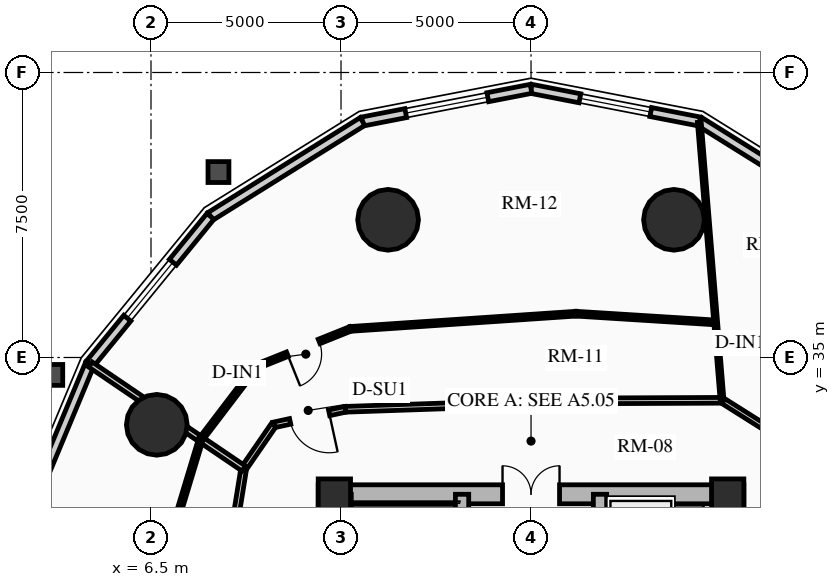
"""IFC4 building model, lengths in metres.
Left out: names, types, materials, properties, quantities, classifications, styles, units other than length and angle.
Written with IfcOpenShell. Run it as: python <this file> out.ifc"""

import sys

from ifc_helpers import new_model, si_unit, direction, frame, frame_2d, origin, origin_2d, place, context, subcontext, project, spatial, rectangle, circle, extrude, source, transform, mapped, element, fill, save


model = new_model("IFC4")
c1 = context("Model", 3, precision=1e-05, world=origin(), true_north=direction((0.0, 1.0)))
c2 = subcontext(c1, "Body", "Model", "MODEL_VIEW")
j1 = project(units=[si_unit("LENGTHUNIT", "METRE"), si_unit("PLANEANGLEUNIT", "RADIAN")], contexts=[c1])
p1 = place(None, origin())
s1 = spatial("IfcSite", under=j1, at=p1, CompositionType="ELEMENT")
p2 = place(p1, origin())
s2 = spatial("IfcBuilding", under=s1, at=p2, CompositionType="ELEMENT")
p3 = place(p2, frame((0.0, 0.0, 27.82)))
s3 = spatial("IfcBuildingStorey", under=s2, at=p3, CompositionType="ELEMENT", Elevation=27.82)
for number, where, z_axis, x_axis in (
    (1, (11.15, 17.35, 0.0), (0.0, 0.0, 1.0), (0.0, 1.0, 0.0)),
    (2, (21.85, 17.35, 0.0), (0.0, 0.0, 1.0), (0.0, 1.0, 0.0)),
):
    element("IfcWall", number, at=place(p3, frame(where, z_axis=z_axis, x_axis=x_axis)), inside=s3, PredefinedType="SHEAR", context=c2, shape_type="SweptSolid", body=[
        extrude(rectangle(XDim=14.3, YDim=0.5, at=frame_2d((7.15, 0.0))), origin(), (0.0, 0.0, 1.0), 2.91),
    ])
p4 = place(p3, frame((11.15, 31.4, 0.0), z_axis=(0.0, 0.0, 1.0), x_axis=(1.0, 0.0, 0.0)))
e3 = element("IfcWall", 3, at=p4, inside=s3, PredefinedType="SHEAR", context=c2, shape_type="SweptSolid", body=[
    extrude(rectangle(XDim=10.7, YDim=0.5, at=frame_2d((5.35, 0.0))), origin(), (0.0, 0.0, 1.0), 2.91),
])
m1 = source(origin(), c2, "Body", "SweptSolid", [
    extrude(rectangle(XDim=1.5, YDim=2.02, at=frame_2d((0.75, 1.01))), frame((0.0, 0.26, 0.0), z_axis=(0.0, -1.0, 0.0), x_axis=(1.0, 0.0, 0.0)), (0.0, 0.0, 1.0), 0.52),
])
p5 = place(p4, frame((4.6, 0.0, 0.0)))
e4 = element("IfcOpeningElement", 4, at=p5, cuts=e3, PredefinedType="OPENING", context=c2, shape_type="MappedRepresentation", body=[
    mapped(m1, transform((0.0, 0.0, 0.0), x_axis=(1.0, 0.0, 0.0), y_axis=(0.0, 1.0, 0.0), z_axis=(0.0, 0.0, 1.0), scale=1.0)),
])
p6 = place(p3, frame((14.685, 17.6, 0.0), z_axis=(0.0, 0.0, 1.0), x_axis=(0.0, 1.0, 0.0)))
e5 = element("IfcWall", 5, at=p6, inside=s3, PredefinedType="SHEAR", context=c2, shape_type="SweptSolid", body=[
    extrude(rectangle(XDim=13.8, YDim=0.35, at=frame_2d((6.9, 0.0))), origin(), (0.0, 0.0, 1.0), 2.91),
])
m2 = source(origin(), c2, "Body", "SweptSolid", [
    extrude(rectangle(XDim=1.1, YDim=2.015, at=frame_2d((0.55, 1.007))), frame((0.0, 0.185, 0.0), z_axis=(0.0, -1.0, 0.0), x_axis=(1.0, 0.0, 0.0)), (0.0, 0.0, 1.0), 0.37),
])
p7 = place(p6, frame((4.9, 0.0, 0.0)))
e6 = element("IfcOpeningElement", 6, at=p7, cuts=e5, PredefinedType="OPENING", context=c2, shape_type="MappedRepresentation", body=[
    mapped(m2, transform((0.0, 0.0, 0.0), x_axis=(1.0, 0.0, 0.0), y_axis=(0.0, 1.0, 0.0), z_axis=(0.0, 0.0, 1.0), scale=1.0)),
])
m3 = source(origin(), c2, "Body", "SweptSolid", [
    extrude(rectangle(XDim=1.15, YDim=2.02, at=frame_2d((0.575, 1.01))), frame((0.0, 0.185, 0.0), z_axis=(0.0, -1.0, 0.0), x_axis=(1.0, 0.0, 0.0)), (0.0, 0.0, 1.0), 0.37),
])
p8 = place(p6, frame((7.32, 0.0, 0.0)))
e7 = element("IfcOpeningElement", 7, at=p8, cuts=e5, PredefinedType="OPENING", context=c2, shape_type="MappedRepresentation", body=[
    mapped(m3, transform((0.0, 0.0, 0.0), x_axis=(1.0, 0.0, 0.0), y_axis=(0.0, 1.0, 0.0), z_axis=(0.0, 0.0, 1.0), scale=1.0)),
])
p9 = place(p3, frame((18.315, 17.6, 0.0), z_axis=(0.0, 0.0, 1.0), x_axis=(0.0, 1.0, 0.0)))
e8 = element("IfcWall", 8, at=p9, inside=s3, PredefinedType="SHEAR", context=c2, shape_type="SweptSolid", body=[
    extrude(rectangle(XDim=13.8, YDim=0.35, at=frame_2d((6.9, 0.0))), origin(), (0.0, 0.0, 1.0), 2.91),
])
p10 = place(p9, frame((10.025, 0.0, 0.0)))
e9 = element("IfcOpeningElement", 9, at=p10, cuts=e8, PredefinedType="OPENING", context=c2, shape_type="MappedRepresentation", body=[
    mapped(m2, transform((0.0, 0.0, 0.0), x_axis=(1.0, 0.0, 0.0), y_axis=(0.0, 1.0, 0.0), z_axis=(0.0, 0.0, 1.0), scale=1.0)),
])
p11 = place(p9, frame((12.025, 0.0, 0.0)))
e10 = element("IfcOpeningElement", 10, at=p11, cuts=e8, PredefinedType="OPENING", context=c2, shape_type="MappedRepresentation", body=[
    mapped(m2, transform((0.0, 0.0, 0.0), x_axis=(1.0, 0.0, 0.0), y_axis=(0.0, 1.0, 0.0), z_axis=(0.0, 0.0, 1.0), scale=1.0)),
])
p12 = place(p9, frame((5.33, 0.0, 0.0)))
e11 = element("IfcOpeningElement", 11, at=p12, cuts=e8, PredefinedType="OPENING", context=c2, shape_type="MappedRepresentation", body=[
    mapped(m3, transform((0.0, 0.0, 0.0), x_axis=(1.0, 0.0, 0.0), y_axis=(0.0, 1.0, 0.0), z_axis=(0.0, 0.0, 1.0), scale=1.0)),
])
p13 = place(p3, frame((11.595, 24.655, 0.0), z_axis=(0.0, 0.0, 1.0), x_axis=(0.0, 1.0, 0.0)))
e12 = element("IfcWall", 12, at=p13, inside=s3, PredefinedType="SHEAR", context=c2, shape_type="SweptSolid", body=[
    extrude(rectangle(XDim=6.745, YDim=0.35, at=frame_2d((3.373, 0.0))), origin(), (0.0, 0.0, 1.0), 2.91),
])
for number, where, z_axis, x_axis in (
    (13, (11.325, 31.38, 0.0), (0.0, 0.0, 1.0), (1.0, 0.0, 0.0)),
    (14, (21.675, 31.38, 0.0), (0.0, 0.0, 1.0), (1.0, 0.0, 0.0)),
):
    element("IfcColumn", number, at=place(p3, frame(where, z_axis=z_axis, x_axis=x_axis)), inside=s3, PredefinedType="COLUMN", context=c2, shape_type="SweptSolid", body=[
        extrude(rectangle(XDim=0.85, YDim=0.85, at=origin_2d()), origin(), (0.0, 0.0, 1.0), 2.91),
    ])
for number, where, z_axis, x_axis in (
    (15, (20.261, 38.623, 0.0), (0.0, 0.0, 1.0), (1.0, 0.0, 0.0)),
    (16, (12.739, 38.623, 0.0), (0.0, 0.0, 1.0), (1.0, 0.0, 0.0)),
    (17, (6.653, 33.229, 0.0), (0.0, 0.0, 1.0), (1.0, 0.0, 0.0)),
):
    element("IfcColumn", number, at=place(p3, frame(where, z_axis=z_axis, x_axis=x_axis)), inside=s3, PredefinedType="USERDEFINED", context=c2, shape_type="SweptSolid", body=[
        extrude(circle(Radius=0.8, at=origin_2d()), origin(), (0.0, 0.0, 1.0), 2.91),
    ])
p14 = place(p3, frame((20.935, 41.21, 0.0), z_axis=(0.0, 0.0, 1.0), x_axis=(0.848422721916, -0.529319265601, 0.0)))
e18 = element("IfcWall", 18, at=p14, inside=s3, PredefinedType="SOLIDWALL", context=c2, shape_type="SweptSolid", body=[
    extrude(rectangle(XDim=4.715, YDim=0.24, at=frame_2d((2.357, 0.0))), origin(), (0.0, 0.0, 1.0), 2.635),
])
p15 = place(p3, frame((16.5, 42.07, 0.0), z_axis=(0.0, 0.0, 1.0), x_axis=(0.981717351035, -0.190344536766, 0.0)))
e19 = element("IfcWall", 19, at=p15, inside=s3, PredefinedType="SOLIDWALL", context=c2, shape_type="SweptSolid", body=[
    extrude(rectangle(XDim=4.517, YDim=0.24, at=frame_2d((2.259, 0.0))), origin(), (0.0, 0.0, 1.0), 2.635),
])
m4 = source(origin(), c2, "Body", "SweptSolid", [
    extrude(rectangle(XDim=1.9, YDim=1.35, at=frame_2d((0.95, 0.675))), frame((0.0, 0.13, 0.0), z_axis=(0.0, -1.0, 0.0), x_axis=(1.0, 0.0, 0.0)), (0.0, 0.0, 1.0), 0.26),
])
p16 = place(p15, frame((1.309, 0.0, 0.65)))
e20 = element("IfcOpeningElement", 20, at=p16, cuts=e19, PredefinedType="OPENING", context=c2, shape_type="MappedRepresentation", body=[
    mapped(m4, transform((0.0, 0.0, 0.0), x_axis=(1.0, 0.0, 0.0), y_axis=(0.0, 1.0, 0.0), z_axis=(0.0, 0.0, 1.0), scale=1.0)),
])
p17 = place(p3, frame((12.065, 41.21, 0.0), z_axis=(0.0, 0.0, 1.0), x_axis=(0.981717351035, 0.190344536766, 0.0)))
e21 = element("IfcWall", 21, at=p17, inside=s3, PredefinedType="SOLIDWALL", context=c2, shape_type="SweptSolid", body=[
    extrude(rectangle(XDim=4.517, YDim=0.24, at=frame_2d((2.259, 0.0))), origin(), (0.0, 0.0, 1.0), 2.635),
])
m5 = source(origin(), c2, "Body", "SweptSolid", [
    extrude(rectangle(XDim=2.2, YDim=1.35, at=frame_2d((1.1, 0.675))), frame((0.0, 0.13, 0.0), z_axis=(0.0, -1.0, 0.0), x_axis=(1.0, 0.0, 0.0)), (0.0, 0.0, 1.0), 0.26),
])
p18 = place(p17, frame((1.159, 0.0, 0.65)))
e22 = element("IfcOpeningElement", 22, at=p18, cuts=e21, PredefinedType="OPENING", context=c2, shape_type="MappedRepresentation", body=[
    mapped(m5, transform((0.0, 0.0, 0.0), x_axis=(1.0, 0.0, 0.0), y_axis=(0.0, 1.0, 0.0), z_axis=(0.0, 0.0, 1.0), scale=1.0)),
])
p19 = place(p3, frame((8.065, 38.714, 0.0), z_axis=(0.0, 0.0, 1.0), x_axis=(0.848422721916, 0.529319265601, 0.0)))
e23 = element("IfcWall", 23, at=p19, inside=s3, PredefinedType="SOLIDWALL", context=c2, shape_type="SweptSolid", body=[
    extrude(rectangle(XDim=4.715, YDim=0.24, at=frame_2d((2.357, 0.0))), origin(), (0.0, 0.0, 1.0), 2.635),
])
p20 = place(p3, frame((4.89, 34.827, 0.0), z_axis=(0.0, 0.0, 1.0), x_axis=(0.632588557044, 0.774488035735, 0.0)))
e24 = element("IfcWall", 24, at=p20, inside=s3, PredefinedType="SOLIDWALL", context=c2, shape_type="SweptSolid", body=[
    extrude(rectangle(XDim=5.019, YDim=0.24, at=frame_2d((2.509, 0.0))), origin(), (0.0, 0.0, 1.0), 2.635),
])
p21 = place(p20, frame((1.559, 0.0, 0.65)))
e25 = element("IfcOpeningElement", 25, at=p21, cuts=e24, PredefinedType="OPENING", context=c2, shape_type="MappedRepresentation", body=[
    mapped(m4, transform((0.0, 0.0, 0.0), x_axis=(1.0, 0.0, 0.0), y_axis=(0.0, 1.0, 0.0), z_axis=(0.0, 0.0, 1.0), scale=1.0)),
])
p22 = place(p3, frame((2.851, 29.929, 0.0), z_axis=(0.0, 0.0, 1.0), x_axis=(0.384255919668, 0.923226618009, 0.0)))
e26 = element("IfcWall", 26, at=p22, inside=s3, PredefinedType="SOLIDWALL", context=c2, shape_type="SweptSolid", body=[
    extrude(rectangle(XDim=5.305, YDim=0.24, at=frame_2d((2.653, 0.0))), origin(), (0.0, 0.0, 1.0), 2.635),
])
p23 = place(p3, frame((22.877, 33.022, 0.0), z_axis=(0.0, 0.0, 1.0), x_axis=(-0.845895608855, 0.533348496689, 0.0)))
e27 = element("IfcWall", 27, at=p23, inside=s3, PredefinedType="PARTITIONING", context=c2, shape_type="SweptSolid", body=[
    extrude(rectangle(XDim=1.597, YDim=0.15, at=frame_2d((0.798, 0.0))), origin(), (0.0, 0.0, 1.0), 2.205),
])
p24 = place(p3, frame((21.527, 33.873, 0.0), z_axis=(0.0, 0.0, 1.0), x_axis=(-0.999991838845, -0.004040079574, 0.0)))
e28 = element("IfcWall", 28, at=p24, inside=s3, PredefinedType="PARTITIONING", context=c2, shape_type="SweptSolid", body=[
    extrude(rectangle(XDim=3.384, YDim=0.15, at=frame_2d((1.692, 0.0))), origin(), (0.0, 0.0, 1.0), 2.159),
])
p25 = place(p3, frame((18.143, 33.86, 0.0), z_axis=(0.0, 0.0, 1.0), x_axis=(-0.999419208319, -0.034077060363, 0.0)))
e29 = element("IfcWall", 29, at=p25, inside=s3, PredefinedType="PARTITIONING", context=c2, shape_type="SweptSolid", body=[
    extrude(rectangle(XDim=6.527, YDim=0.15, at=frame_2d((3.263, 0.0))), origin(), (0.0, 0.0, 1.0), 2.159),
])
p26 = place(p3, frame((11.62, 33.637, 0.0), z_axis=(0.0, 0.0, 1.0), x_axis=(-0.97702579435, -0.213121085711, 0.0)))
e30 = element("IfcWall", 30, at=p26, inside=s3, PredefinedType="PARTITIONING", context=c2, shape_type="SweptSolid", body=[
    extrude(rectangle(XDim=1.935, YDim=0.15, at=frame_2d((0.967, 0.0))), origin(), (0.0, 0.0, 1.0), 2.159),
])
m6 = source(origin(), c2, "Body", "SweptSolid", [
    extrude(rectangle(XDim=1.05, YDim=2.015, at=frame_2d((0.525, 1.007))), frame((0.0, 0.085, 0.0), z_axis=(0.0, -1.0, 0.0), x_axis=(1.0, 0.0, 0.0)), (0.0, 0.0, 1.0), 0.17),
])
p27 = place(p26, frame((0.442, 0.0, 0.0)))
e31 = element("IfcOpeningElement", 31, at=p27, cuts=e30, PredefinedType="OPENING", context=c2, shape_type="MappedRepresentation", body=[
    mapped(m6, transform((0.0, 0.0, 0.0), x_axis=(1.0, 0.0, 0.0), y_axis=(0.0, 1.0, 0.0), z_axis=(0.0, 0.0, 1.0), scale=1.0)),
])
p28 = place(p3, frame((9.729, 33.225, 0.0), z_axis=(0.0, 0.0, 1.0), x_axis=(-0.567183649484, -0.82359134755, 0.0)))
e32 = element("IfcWall", 32, at=p28, inside=s3, PredefinedType="PARTITIONING", context=c2, shape_type="SweptSolid", body=[
    extrude(rectangle(XDim=1.392, YDim=0.15, at=frame_2d((0.696, 0.0))), origin(), (0.0, 0.0, 1.0), 2.159),
])
p29 = place(p3, frame((8.94, 32.078, 0.0), z_axis=(0.0, 0.0, 1.0), x_axis=(-0.159148467753, -0.98725466077, 0.0)))
e33 = element("IfcWall", 33, at=p29, inside=s3, PredefinedType="PARTITIONING", context=c2, shape_type="SweptSolid", body=[
    extrude(rectangle(XDim=1.554, YDim=0.15, at=frame_2d((0.777, 0.0))), origin(), (0.0, 0.0, 1.0), 2.205),
])
p30 = place(p3, frame((21.527, 33.873, 0.0), z_axis=(0.0, 0.0, 1.0), x_axis=(-0.081501553037, 0.996673214676, 0.0)))
e34 = element("IfcWall", 34, at=p30, inside=s3, PredefinedType="MOVABLE", context=c2, shape_type="SweptSolid", body=[
    extrude(rectangle(XDim=7.342, YDim=0.1, at=frame_2d((3.671, 0.0))), origin(), (0.0, 0.0, 1.0), 2.073),
])
p31 = place(p3, frame((8.94, 32.078, 0.0), z_axis=(0.0, 0.0, 1.0), x_axis=(-0.827476605417, 0.561500193666, 0.0)))
e35 = element("IfcWall", 35, at=p31, inside=s3, PredefinedType="PARTITIONING", context=c2, shape_type="SweptSolid", body=[
    extrude(rectangle(XDim=4.875, YDim=0.16, at=frame_2d((2.438, 0.0))), origin(), (0.0, 0.0, 1.0), 2.073),
])
p32 = place(p3, frame((21.359, 35.922, 0.0), z_axis=(0.0, 0.0, 1.0), x_axis=(-0.998040956573, 0.062563959294, 0.0)))
e36 = element("IfcWall", 36, at=p32, inside=s3, PredefinedType="PARTITIONING", context=c2, shape_type="SweptSolid", body=[
    extrude(rectangle(XDim=3.684, YDim=0.125, at=frame_2d((1.842, 0.0))), origin(), (0.0, 0.0, 1.0), 2.159),
])
p33 = place(p3, frame((17.683, 36.153, 0.0), z_axis=(0.0, 0.0, 1.0), x_axis=(-0.997730540088, -0.067333270944, 0.0)))
e37 = element("IfcWall", 37, at=p33, inside=s3, PredefinedType="PARTITIONING", context=c2, shape_type="SweptSolid", body=[
    extrude(rectangle(XDim=5.95, YDim=0.125, at=frame_2d((2.975, 0.0))), origin(), (0.0, 0.0, 1.0), 2.159),
])
p34 = place(p3, frame((11.746, 35.752, 0.0), z_axis=(0.0, 0.0, 1.0), x_axis=(-0.928091790064, -0.372351486119, 0.0)))
e38 = element("IfcWall", 38, at=p34, inside=s3, PredefinedType="PARTITIONING", context=c2, shape_type="SweptSolid", body=[
    extrude(rectangle(XDim=2.672, YDim=0.125, at=frame_2d((1.336, 0.0))), origin(), (0.0, 0.0, 1.0), 2.205),
])
m7 = source(origin(), c2, "Body", "SweptSolid", [
    extrude(rectangle(XDim=0.9, YDim=2.005, at=frame_2d((0.45, 1.002))), frame((0.0, 0.073, 0.0), z_axis=(0.0, -1.0, 0.0), x_axis=(1.0, 0.0, 0.0)), (0.0, 0.0, 1.0), 0.145),
])
p35 = place(p34, frame((0.886, 0.0, 0.0)))
e39 = element("IfcOpeningElement", 39, at=p35, cuts=e38, PredefinedType="OPENING", context=c2, shape_type="MappedRepresentation", body=[
    mapped(m7, transform((0.0, 0.0, 0.0), x_axis=(1.0, 0.0, 0.0), y_axis=(0.0, 1.0, 0.0), z_axis=(0.0, 0.0, 1.0), scale=1.0)),
])
p36 = place(p3, frame((9.267, 34.757, 0.0), z_axis=(0.0, 0.0, 1.0), x_axis=(-0.60573716219, -0.795664810295, 0.0)))
e40 = element("IfcWall", 40, at=p36, inside=s3, PredefinedType="PARTITIONING", context=c2, shape_type="SweptSolid", body=[
    extrude(rectangle(XDim=2.404, YDim=0.125, at=frame_2d((1.202, 0.0))), origin(), (0.0, 0.0, 1.0), 2.159),
])
p37 = place(p3, frame((7.811, 32.845, 0.0), z_axis=(0.0, 0.0, 1.0), x_axis=(-0.289357304294, -0.957221160679, 0.0)))
e41 = element("IfcWall", 41, at=p37, inside=s3, PredefinedType="PARTITIONING", context=c2, shape_type="SweptSolid", body=[
    extrude(rectangle(XDim=2.585, YDim=0.125, at=frame_2d((1.292, 0.0))), origin(), (0.0, 0.0, 1.0), 2.159),
])
m8 = source(origin(), c2, "Body", "SweptSolid", [
    extrude(rectangle(XDim=1.9, YDim=1.35, at=frame_2d((0.95, 0.675))), frame((0.0, 0.03, 0.0), z_axis=(0.0, -1.0, 0.0), x_axis=(1.0, 0.0, 0.0)), (0.0, 0.0, 1.0), 0.06),
])
p38 = place(p16, origin())
e42 = element("IfcWindow", 42, at=p38, inside=s3, PartitioningType="DOUBLE_PANEL_VERTICAL", PredefinedType="WINDOW", context=c2, shape_type="MappedRepresentation", body=[
    mapped(m8, transform((0.0, 0.0, 0.0), x_axis=(1.0, 0.0, 0.0), y_axis=(0.0, 1.0, 0.0), z_axis=(0.0, 0.0, 1.0), scale=1.0)),
])
fill(e20, e42)
m9 = source(origin(), c2, "Body", "SweptSolid", [
    extrude(rectangle(XDim=2.2, YDim=1.35, at=frame_2d((1.1, 0.675))), frame((0.0, 0.03, 0.0), z_axis=(0.0, -1.0, 0.0), x_axis=(1.0, 0.0, 0.0)), (0.0, 0.0, 1.0), 0.06),
])
p39 = place(p18, origin())
e43 = element("IfcWindow", 43, at=p39, inside=s3, PartitioningType="DOUBLE_PANEL_VERTICAL", PredefinedType="WINDOW", context=c2, shape_type="MappedRepresentation", body=[
    mapped(m9, transform((0.0, 0.0, 0.0), x_axis=(1.0, 0.0, 0.0), y_axis=(0.0, 1.0, 0.0), z_axis=(0.0, 0.0, 1.0), scale=1.0)),
])
fill(e22, e43)
p40 = place(p21, origin())
e44 = element("IfcWindow", 44, at=p40, inside=s3, PartitioningType="DOUBLE_PANEL_VERTICAL", PredefinedType="WINDOW", context=c2, shape_type="MappedRepresentation", body=[
    mapped(m8, transform((0.0, 0.0, 0.0), x_axis=(1.0, 0.0, 0.0), y_axis=(0.0, 1.0, 0.0), z_axis=(0.0, 0.0, 1.0), scale=1.0)),
])
fill(e25, e44)
m10 = source(origin(), c2, "Body", "SweptSolid", [
    extrude(rectangle(XDim=1.5, YDim=2.02, at=frame_2d((0.75, 1.01))), frame((0.0, 0.025, 0.0), z_axis=(0.0, -1.0, 0.0), x_axis=(1.0, 0.0, 0.0)), (0.0, 0.0, 1.0), 0.05),
])
p41 = place(p5, origin())
e45 = element("IfcDoor", 45, at=p41, inside=s3, OperationType="DOUBLE_DOOR_SINGLE_SWING", PredefinedType="DOOR", context=c2, shape_type="MappedRepresentation", body=[
    mapped(m10, transform((0.0, 0.0, 0.0), x_axis=(1.0, 0.0, 0.0), y_axis=(0.0, 1.0, 0.0), z_axis=(0.0, 0.0, 1.0), scale=1.0)),
])
fill(e4, e45)
m11 = source(origin(), c2, "Body", "SweptSolid", [
    extrude(rectangle(XDim=1.05, YDim=2.015, at=frame_2d((0.525, 1.007))), frame((0.0, 0.025, 0.0), z_axis=(0.0, -1.0, 0.0), x_axis=(1.0, 0.0, 0.0)), (0.0, 0.0, 1.0), 0.05),
])
p42 = place(p27, origin())
e46 = element("IfcDoor", 46, at=p42, inside=s3, OperationType="SINGLE_SWING_LEFT", PredefinedType="DOOR", context=c2, shape_type="MappedRepresentation", body=[
    mapped(m11, transform((0.0, 0.0, 0.0), x_axis=(1.0, 0.0, 0.0), y_axis=(0.0, 1.0, 0.0), z_axis=(0.0, 0.0, 1.0), scale=1.0)),
])
fill(e31, e46)
m12 = source(origin(), c2, "Body", "SweptSolid", [
    extrude(rectangle(XDim=0.9, YDim=2.005, at=frame_2d((0.45, 1.002))), frame((0.0, 0.025, 0.0), z_axis=(0.0, -1.0, 0.0), x_axis=(1.0, 0.0, 0.0)), (0.0, 0.0, 1.0), 0.05),
])
p43 = place(p35, origin())
e47 = element("IfcDoor", 47, at=p43, inside=s3, OperationType="SINGLE_SWING_RIGHT", PredefinedType="DOOR", context=c2, shape_type="MappedRepresentation", body=[
    mapped(m12, transform((0.0, 0.0, 0.0), x_axis=(1.0, 0.0, 0.0), y_axis=(0.0, 1.0, 0.0), z_axis=(0.0, 0.0, 1.0), scale=1.0)),
])
fill(e39, e47)
save(model, sys.argv[1])
